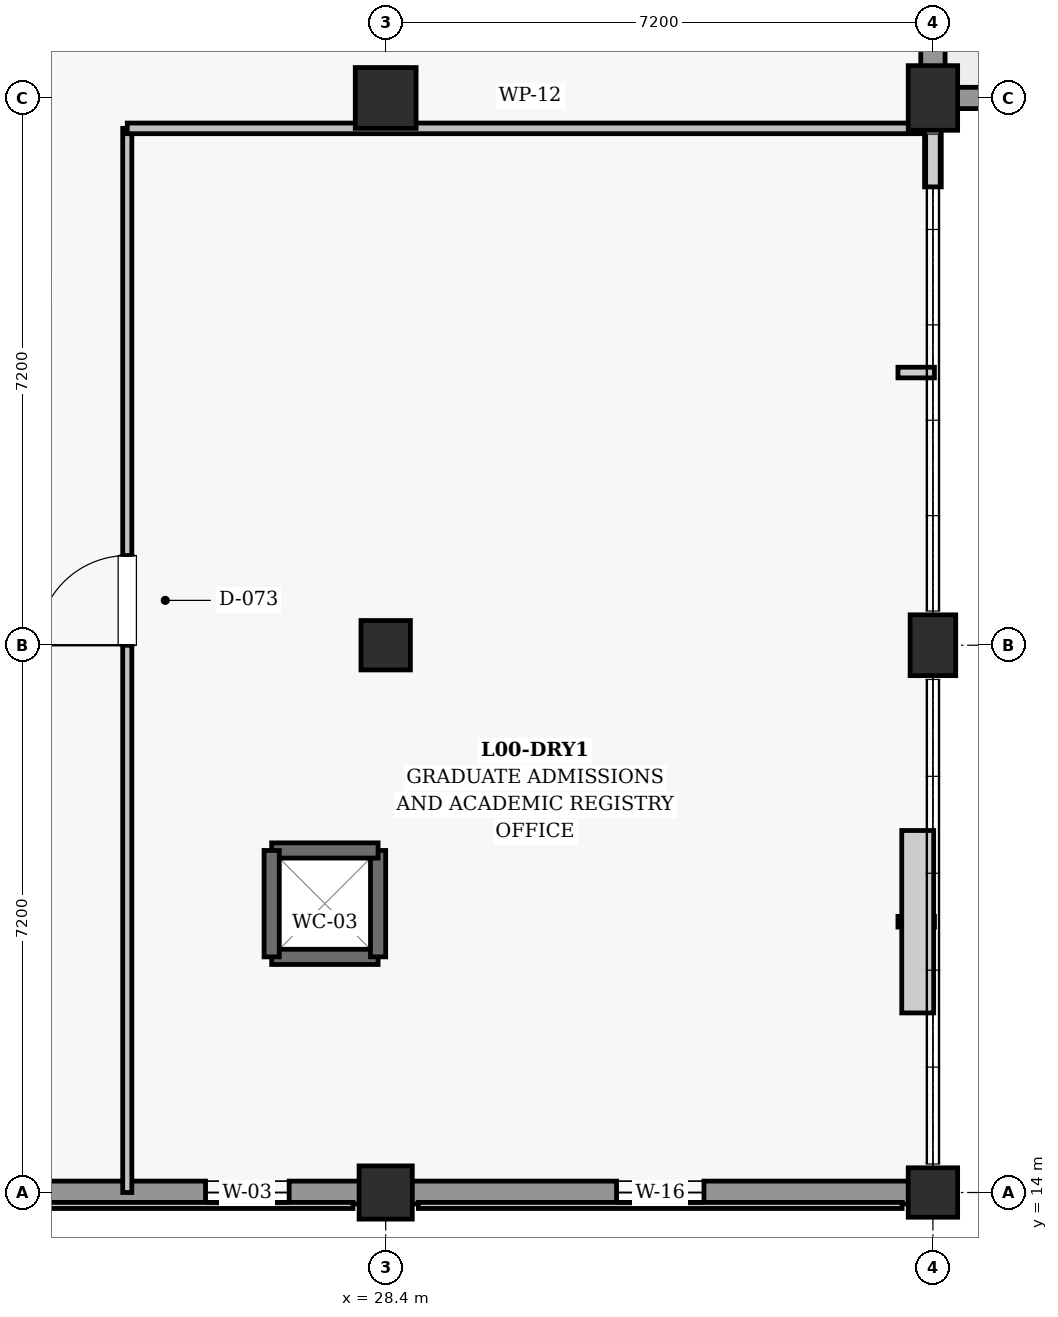
"""IFC4 building model, lengths in metres.
Left out: names, types, materials, properties, quantities, classifications, styles, units other than length and angle.
Written with IfcOpenShell. Run it as: python <this file> out.ifc"""

import sys

from ifc_helpers import new_model, si_unit, direction, frame, frame_2d, origin, origin_2d, place, context, subcontext, project, spatial, polyline, rectangle, outline, extrude, element, fill, save


model = new_model("IFC4")
c1 = context("Model", 3, precision=1e-05, world=origin(), true_north=direction((0.0, 1.0)))
c2 = subcontext(c1, "Body", "Model", "MODEL_VIEW")
j1 = project(units=[si_unit("LENGTHUNIT", "METRE"), si_unit("PLANEANGLEUNIT", "RADIAN")], contexts=[c1])
p1 = place(None, origin())
s1 = spatial("IfcSite", under=j1, at=p1, CompositionType="ELEMENT")
p2 = place(p1, origin())
s2 = spatial("IfcBuilding", under=s1, at=p2, CompositionType="ELEMENT")
p3 = place(p2, origin())
s3 = spatial("IfcBuildingStorey", under=s2, at=p3, CompositionType="ELEMENT", Elevation=0.0)
p4 = place(p3, frame((28.4, 14.0, 0.0), z_axis=(0.0, 0.0, 1.0), x_axis=(1.0, 0.0, 0.0)))
e1 = element("IfcColumn", 1, at=p4, inside=s3, PredefinedType="COLUMN", context=c2, shape_type="SweptSolid", body=[
    extrude(rectangle(XDim=0.7, YDim=0.7, at=origin_2d()), origin(), (0.0, 0.0, 1.0), 5.4),
])
p5 = place(p3, frame((28.4, 21.2, 0.0), z_axis=(0.0, 0.0, 1.0), x_axis=(1.0, 0.0, 0.0)))
e2 = element("IfcColumn", 2, at=p5, inside=s3, PredefinedType="COLUMN", context=c2, shape_type="SweptSolid", body=[
    extrude(rectangle(XDim=0.65, YDim=0.65, at=origin_2d()), origin(), (0.0, 0.0, 1.0), 5.4),
])
p6 = place(p3, frame((28.4, 28.4, 0.0), z_axis=(0.0, 0.0, 1.0), x_axis=(1.0, 0.0, 0.0)))
e3 = element("IfcColumn", 3, at=p6, inside=s3, PredefinedType="COLUMN", context=c2, shape_type="SweptSolid", body=[
    extrude(rectangle(XDim=0.8, YDim=0.8, at=origin_2d()), origin(), (0.0, 0.0, 1.0), 5.4),
])
p7 = place(p3, frame((35.6, 14.0, 0.0), z_axis=(0.0, 0.0, 1.0), x_axis=(1.0, 0.0, 0.0)))
e4 = element("IfcColumn", 4, at=p7, inside=s3, PredefinedType="COLUMN", context=c2, shape_type="SweptSolid", body=[
    extrude(rectangle(XDim=0.65, YDim=0.65, at=origin_2d()), origin(), (0.0, 0.0, 1.0), 5.4),
])
p8 = place(p3, frame((35.6, 21.2, 0.0), z_axis=(0.0, 0.0, 1.0), x_axis=(1.0, 0.0, 0.0)))
e5 = element("IfcColumn", 5, at=p8, inside=s3, PredefinedType="COLUMN", context=c2, shape_type="SweptSolid", body=[
    extrude(rectangle(XDim=0.6, YDim=0.8, at=origin_2d()), origin(), (0.0, 0.0, 1.0), 5.4),
])
p9 = place(p3, frame((35.6, 28.4, 0.0), z_axis=(0.0, 0.0, 1.0), x_axis=(1.0, 0.0, 0.0)))
e6 = element("IfcColumn", 6, at=p9, inside=s3, PredefinedType="COLUMN", context=c2, shape_type="SweptSolid", body=[
    extrude(rectangle(XDim=0.65, YDim=0.85, at=origin_2d()), origin(), (0.0, 0.0, 1.0), 5.4),
])
p10 = place(p3, frame((35.6, 28.805, 0.0), z_axis=(0.0, 0.0, 1.0), x_axis=(0.0, 1.0, 0.0)))
e7 = element("IfcWall", 7, at=p10, inside=s3, PredefinedType="SOLIDWALL", context=c2, shape_type="SweptSolid", body=[
    extrude(rectangle(XDim=6.365, YDim=0.32, at=frame_2d((3.183, 0.0))), origin(), (0.0, 0.0, 1.0), 4.475),
])
p11 = place(p10, frame((2.183, 0.0, 0.0)))
e8 = element("IfcOpeningElement", 8, at=p11, cuts=e7, PredefinedType="OPENING", context=c2, shape_type="SweptSolid", body=[
    extrude(rectangle(XDim=2.0, YDim=2.4, at=frame_2d((1.0, 1.2))), frame((0.0, 0.17, 0.0), z_axis=(0.0, -1.0, 0.0), x_axis=(1.0, 0.0, 0.0)), (0.0, 0.0, 1.0), 0.34),
])
p12 = place(p3, frame((21.48, 14.0, 0.0), z_axis=(0.0, 0.0, 1.0), x_axis=(1.0, 0.0, 0.0)))
e9 = element("IfcWall", 9, at=p12, inside=s3, PredefinedType="SOLIDWALL", context=c2, shape_type="SweptSolid", body=[
    extrude(rectangle(XDim=6.59, YDim=0.3, at=frame_2d((3.295, 0.0))), origin(), (0.0, 0.0, 1.0), 4.375),
])
p13 = place(p12, frame((4.55, 0.0, 0.95)))
e10 = element("IfcOpeningElement", 10, at=p13, cuts=e9, PredefinedType="OPENING", context=c2, shape_type="SweptSolid", body=[
    extrude(rectangle(XDim=1.1, YDim=2.3, at=frame_2d((0.55, 1.15))), frame((0.0, 0.16, 0.0), z_axis=(0.0, -1.0, 0.0), x_axis=(1.0, 0.0, 0.0)), (0.0, 0.0, 1.0), 0.32),
])
p14 = place(p3, frame((28.73, 14.0, 0.0), z_axis=(0.0, 0.0, 1.0), x_axis=(1.0, 0.0, 0.0)))
e11 = element("IfcWall", 11, at=p14, inside=s3, PredefinedType="SOLIDWALL", context=c2, shape_type="SweptSolid", body=[
    extrude(rectangle(XDim=6.565, YDim=0.3, at=frame_2d((3.282, 0.0))), origin(), (0.0, 0.0, 1.0), 4.475),
])
p15 = place(p14, frame((2.708, 0.0, 0.95)))
e12 = element("IfcOpeningElement", 12, at=p15, cuts=e11, PredefinedType="OPENING", context=c2, shape_type="SweptSolid", body=[
    extrude(rectangle(XDim=1.15, YDim=2.25, at=frame_2d((0.575, 1.125))), frame((0.0, 0.16, 0.0), z_axis=(0.0, -1.0, 0.0), x_axis=(1.0, 0.0, 0.0)), (0.0, 0.0, 1.0), 0.32),
])
p16 = place(p3, frame((35.89, 28.4, 3.3), z_axis=(0.0, 0.0, 1.0), x_axis=(1.0, 0.0, 0.0)))
e13 = element("IfcWall", 13, at=p16, inside=s3, PredefinedType="SOLIDWALL", context=c2, shape_type="SweptSolid", body=[
    extrude(outline(polyline([(0.0, 0.0), (1.747, 0.52), (3.36, 1.06), (4.973, 0.52), (6.72, 0.0), (6.72, 1.12), (0.0, 1.12), (0.0, 0.0)])), frame((0.0, 0.14, 0.0), z_axis=(0.0, -1.0, 0.0), x_axis=(1.0, 0.0, 0.0)), (0.0, 0.0, 1.0), 0.28),
])
p17 = place(p3, frame((26.9, 17.1, 0.0), z_axis=(0.0, 0.0, 1.0), x_axis=(1.0, 0.0, 0.0)))
e14 = element("IfcWall", 14, at=p17, inside=s3, PredefinedType="SHEAR", context=c2, shape_type="SweptSolid", body=[
    extrude(rectangle(XDim=1.4, YDim=0.2, at=frame_2d((0.7, 0.0))), origin(), (0.0, 0.0, 1.0), 5.06),
])
p18 = place(p3, frame((28.3, 17.1, 0.0), z_axis=(0.0, 0.0, 1.0), x_axis=(0.0, 1.0, 0.0)))
e15 = element("IfcWall", 15, at=p18, inside=s3, PredefinedType="SHEAR", context=c2, shape_type="SweptSolid", body=[
    extrude(rectangle(XDim=1.4, YDim=0.2, at=frame_2d((0.7, 0.0))), origin(), (0.0, 0.0, 1.0), 5.06),
])
p19 = place(p3, frame((28.3, 18.5, 0.0), z_axis=(0.0, 0.0, 1.0), x_axis=(-1.0, 0.0, 0.0)))
e16 = element("IfcWall", 16, at=p19, inside=s3, PredefinedType="SHEAR", context=c2, shape_type="SweptSolid", body=[
    extrude(rectangle(XDim=1.4, YDim=0.2, at=frame_2d((0.7, 0.0))), origin(), (0.0, 0.0, 1.0), 5.06),
])
p20 = place(p3, frame((26.9, 18.5, 0.0), z_axis=(0.0, 0.0, 1.0), x_axis=(0.0, -1.0, 0.0)))
e17 = element("IfcWall", 17, at=p20, inside=s3, PredefinedType="SHEAR", context=c2, shape_type="SweptSolid", body=[
    extrude(rectangle(XDim=1.4, YDim=0.2, at=frame_2d((0.7, 0.0))), origin(), (0.0, 0.0, 1.0), 5.06),
])
p21 = place(p3, frame((25.0, 14.0, 0.0), z_axis=(0.0, 0.0, 1.0), x_axis=(0.0, 1.0, 0.0)))
e18 = element("IfcWall", 18, at=p21, inside=s3, PredefinedType="PARTITIONING", context=c2, shape_type="SweptSolid", body=[
    extrude(rectangle(XDim=14.0, YDim=0.12, at=frame_2d((7.0, 0.0))), origin(), (0.0, 0.0, 1.0), 4.38),
])
p22 = place(p21, frame((7.2, 0.0, 0.0)))
e19 = element("IfcOpeningElement", 19, at=p22, cuts=e18, PredefinedType="OPENING", context=c2, shape_type="SweptSolid", body=[
    extrude(rectangle(XDim=1.18, YDim=2.2, at=frame_2d((0.59, 1.1))), frame((0.0, 0.07, 0.0), z_axis=(0.0, -1.0, 0.0), x_axis=(1.0, 0.0, 0.0)), (0.0, 0.0, 1.0), 0.14),
])
p23 = place(p3, frame((25.0, 28.0, 0.0), z_axis=(0.0, 0.0, 1.0), x_axis=(1.0, 0.0, 0.0)))
e20 = element("IfcWall", 20, at=p23, inside=s3, PredefinedType="PARTITIONING", context=c2, shape_type="SweptSolid", body=[
    extrude(rectangle(XDim=10.6, YDim=0.14, at=frame_2d((5.3, 0.0))), origin(), (0.0, 0.0, 1.0), 4.48),
])
p24 = place(p13, origin())
e21 = element("IfcWindow", 21, at=p24, inside=s3, PartitioningType="SINGLE_PANEL", PredefinedType="WINDOW", context=c2, shape_type="SweptSolid", body=[
    extrude(rectangle(XDim=1.1, YDim=2.3, at=frame_2d((0.55, 1.15))), frame((0.0, 0.03, 0.0), z_axis=(0.0, -1.0, 0.0), x_axis=(1.0, 0.0, 0.0)), (0.0, 0.0, 1.0), 0.06),
])
fill(e10, e21)
p25 = place(p15, origin())
e22 = element("IfcWindow", 22, at=p25, inside=s3, PartitioningType="SINGLE_PANEL", PredefinedType="WINDOW", context=c2, shape_type="SweptSolid", body=[
    extrude(rectangle(XDim=1.15, YDim=2.25, at=frame_2d((0.575, 1.125))), frame((0.0, 0.03, 0.0), z_axis=(0.0, -1.0, 0.0), x_axis=(1.0, 0.0, 0.0)), (0.0, 0.0, 1.0), 0.06),
])
fill(e12, e22)
p26 = place(p22, origin())
e23 = element("IfcDoor", 23, at=p26, inside=s3, OperationType="SINGLE_SWING_LEFT", PredefinedType="DOOR", context=c2, shape_type="SweptSolid", body=[
    extrude(rectangle(XDim=1.18, YDim=2.2, at=frame_2d((0.59, 1.1))), frame((0.0, 0.025, 0.0), z_axis=(0.0, -1.0, 0.0), x_axis=(1.0, 0.0, 0.0)), (0.0, 0.0, 1.0), 0.05),
])
fill(e19, e23)
save(model, sys.argv[1])
